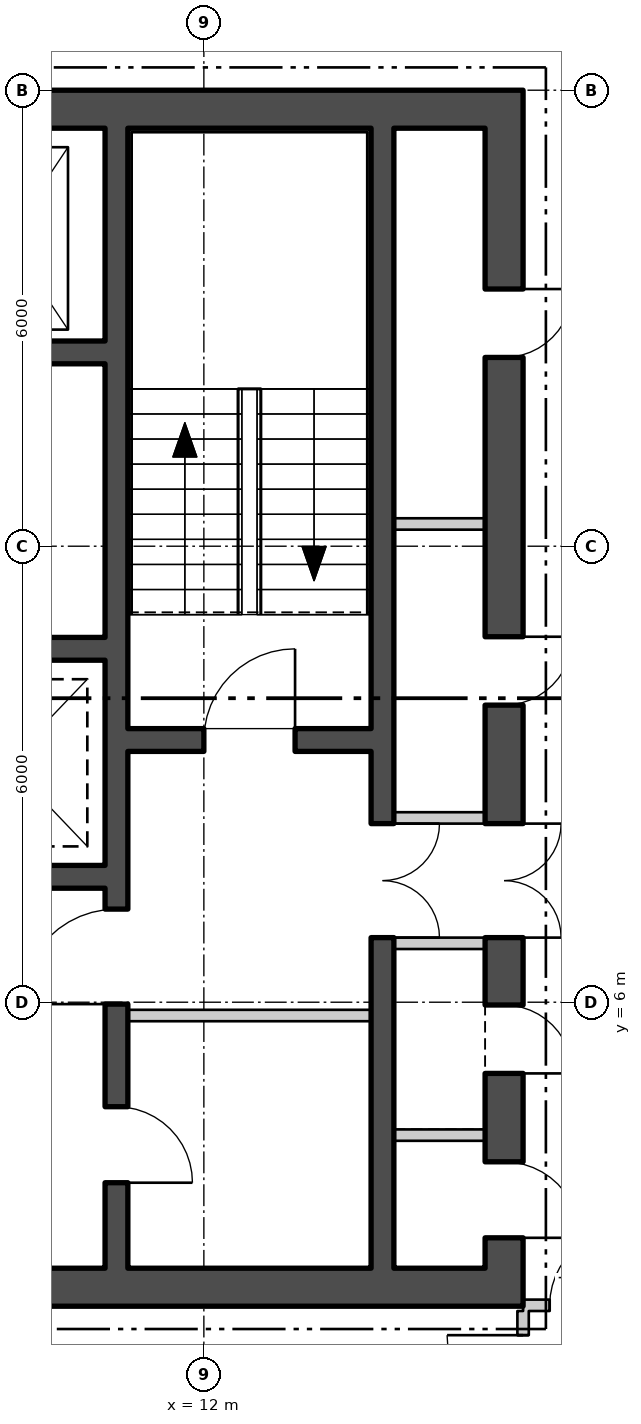
"""IFC4 building model, lengths in metres.
Left out: names, types, materials, properties, quantities, classifications, styles, units other than length and angle.
Written with IfcOpenShell. Run it as: python <this file> out.ifc"""

import sys

from ifc_helpers import new_model, si_unit, direction, frame, frame_2d, origin, place, context, subcontext, project, spatial, polyline, rectangle, outline, extrude, element, fill, save


model = new_model("IFC4")
c1 = context("Model", 3, precision=1e-05, world=origin(), true_north=direction((0.0, 1.0)))
c2 = subcontext(c1, "Body", "Model", "MODEL_VIEW")
j1 = project(units=[si_unit("LENGTHUNIT", "METRE"), si_unit("PLANEANGLEUNIT", "RADIAN")], contexts=[c1])
p1 = place(None, origin())
s1 = spatial("IfcSite", under=j1, at=p1, CompositionType="ELEMENT")
p2 = place(p1, origin())
s2 = spatial("IfcBuilding", under=s1, at=p2, CompositionType="ELEMENT")
p3 = place(p2, frame((0.0, 0.0, 186.6)))
s3 = spatial("IfcBuildingStorey", under=s2, at=p3, CompositionType="ELEMENT", Elevation=186.6)
p4 = place(p3, frame((3.8, -26.219, -0.18), z_axis=(0.0, 0.0, 1.0), x_axis=(0.500000711659, 0.866024992908, 0.0)))
e1 = element("IfcWall", 1, at=p4, inside=s3, PredefinedType="SOLIDWALL", context=c2, shape_type="SweptSolid", body=[
    extrude(outline(polyline([(-0.13, -0.225), (45.87, -0.225), (45.61, 0.225), (0.13, 0.225), (-0.13, -0.225)])), origin(), (0.0, 0.0, 1.0), 6.0),
])
p5 = place(p4, frame((1.424, 0.0, 1.38)))
e2 = element("IfcOpeningElement", 2, at=p5, cuts=e1, PredefinedType="OPENING", context=c2, shape_type="SweptSolid", body=[
    extrude(rectangle(XDim=2.4, YDim=3.6, at=frame_2d((1.2, 1.8))), frame((0.0, 0.235, 0.0), z_axis=(0.0, -1.0, 0.0), x_axis=(1.0, 0.0, 0.0)), (0.0, 0.0, 1.0), 0.47),
])
p6 = place(p4, frame((5.893, 0.0, 1.38)))
e3 = element("IfcOpeningElement", 3, at=p6, cuts=e1, PredefinedType="OPENING", context=c2, shape_type="SweptSolid", body=[
    extrude(rectangle(XDim=2.4, YDim=3.6, at=frame_2d((1.2, 1.8))), frame((0.0, 0.235, 0.0), z_axis=(0.0, -1.0, 0.0), x_axis=(1.0, 0.0, 0.0)), (0.0, 0.0, 1.0), 0.47),
])
p7 = place(p4, frame((10.401, 0.0, 1.38)))
e4 = element("IfcOpeningElement", 4, at=p7, cuts=e1, PredefinedType="OPENING", context=c2, shape_type="SweptSolid", body=[
    extrude(rectangle(XDim=2.4, YDim=3.6, at=frame_2d((1.2, 1.8))), frame((0.0, 0.235, 0.0), z_axis=(0.0, -1.0, 0.0), x_axis=(1.0, 0.0, 0.0)), (0.0, 0.0, 1.0), 0.47),
])
p8 = place(p4, frame((14.909, 0.0, 1.38)))
e5 = element("IfcOpeningElement", 5, at=p8, cuts=e1, PredefinedType="OPENING", context=c2, shape_type="SweptSolid", body=[
    extrude(rectangle(XDim=2.4, YDim=3.6, at=frame_2d((1.2, 1.8))), frame((0.0, 0.235, 0.0), z_axis=(0.0, -1.0, 0.0), x_axis=(1.0, 0.0, 0.0)), (0.0, 0.0, 1.0), 0.47),
])
p9 = place(p4, frame((19.416, 0.0, 1.38)))
e6 = element("IfcOpeningElement", 6, at=p9, cuts=e1, PredefinedType="OPENING", context=c2, shape_type="SweptSolid", body=[
    extrude(rectangle(XDim=2.4, YDim=3.6, at=frame_2d((1.2, 1.8))), frame((0.0, 0.235, 0.0), z_axis=(0.0, -1.0, 0.0), x_axis=(1.0, 0.0, 0.0)), (0.0, 0.0, 1.0), 0.47),
])
p10 = place(p4, frame((23.924, 0.0, 1.38)))
e7 = element("IfcOpeningElement", 7, at=p10, cuts=e1, PredefinedType="OPENING", context=c2, shape_type="SweptSolid", body=[
    extrude(rectangle(XDim=2.4, YDim=3.6, at=frame_2d((1.2, 1.8))), frame((0.0, 0.235, 0.0), z_axis=(0.0, -1.0, 0.0), x_axis=(1.0, 0.0, 0.0)), (0.0, 0.0, 1.0), 0.47),
])
p11 = place(p4, frame((28.431, 0.0, 1.38)))
e8 = element("IfcOpeningElement", 8, at=p11, cuts=e1, PredefinedType="OPENING", context=c2, shape_type="SweptSolid", body=[
    extrude(rectangle(XDim=2.4, YDim=3.6, at=frame_2d((1.2, 1.8))), frame((0.0, 0.235, 0.0), z_axis=(0.0, -1.0, 0.0), x_axis=(1.0, 0.0, 0.0)), (0.0, 0.0, 1.0), 0.47),
])
p12 = place(p4, frame((32.939, 0.0, 1.38)))
e9 = element("IfcOpeningElement", 9, at=p12, cuts=e1, PredefinedType="OPENING", context=c2, shape_type="SweptSolid", body=[
    extrude(rectangle(XDim=2.4, YDim=3.6, at=frame_2d((1.2, 1.8))), frame((0.0, 0.235, 0.0), z_axis=(0.0, -1.0, 0.0), x_axis=(1.0, 0.0, 0.0)), (0.0, 0.0, 1.0), 0.47),
])
p13 = place(p4, frame((37.447, 0.0, 1.38)))
e10 = element("IfcOpeningElement", 10, at=p13, cuts=e1, PredefinedType="OPENING", context=c2, shape_type="SweptSolid", body=[
    extrude(rectangle(XDim=2.4, YDim=3.6, at=frame_2d((1.2, 1.8))), frame((0.0, 0.235, 0.0), z_axis=(0.0, -1.0, 0.0), x_axis=(1.0, 0.0, 0.0)), (0.0, 0.0, 1.0), 0.47),
])
p14 = place(p4, frame((41.916, 0.0, 1.38)))
e11 = element("IfcOpeningElement", 11, at=p14, cuts=e1, PredefinedType="OPENING", context=c2, shape_type="SweptSolid", body=[
    extrude(rectangle(XDim=2.4, YDim=3.6, at=frame_2d((1.2, 1.8))), frame((0.0, 0.235, 0.0), z_axis=(0.0, -1.0, 0.0), x_axis=(1.0, 0.0, 0.0)), (0.0, 0.0, 1.0), 0.47),
])
p15 = place(p3, frame((-16.2, 2.25, 0.0), z_axis=(0.0, 0.0, 1.0), x_axis=(1.0, 0.0, 0.0)))
e12 = element("IfcWall", 12, at=p15, inside=s3, PredefinedType="SHEAR", context=c2, shape_type="SweptSolid", body=[
    extrude(rectangle(XDim=32.4, YDim=0.5, at=frame_2d((16.2, 0.0))), origin(), (0.0, 0.0, 1.0), 5.8),
])
p16 = place(p15, frame((10.7, 0.0, 0.0)))
e13 = element("IfcOpeningElement", 13, at=p16, cuts=e12, PredefinedType="OPENING", context=c2, shape_type="SweptSolid", body=[
    extrude(rectangle(XDim=1.8, YDim=2.4, at=frame_2d((0.9, 1.2))), frame((0.0, 0.26, 0.0), z_axis=(0.0, -1.0, 0.0), x_axis=(1.0, 0.0, 0.0)), (0.0, 0.0, 1.0), 0.52),
])
p17 = place(p15, frame((20.7, 0.0, 0.0)))
e14 = element("IfcOpeningElement", 14, at=p17, cuts=e12, PredefinedType="OPENING", context=c2, shape_type="SweptSolid", body=[
    extrude(rectangle(XDim=1.8, YDim=2.4, at=frame_2d((0.9, 1.2))), frame((0.0, 0.26, 0.0), z_axis=(0.0, -1.0, 0.0), x_axis=(1.0, 0.0, 0.0)), (0.0, 0.0, 1.0), 0.52),
])
p18 = place(p3, frame((-16.2, 17.75, 0.0), z_axis=(0.0, 0.0, 1.0), x_axis=(1.0, 0.0, 0.0)))
e15 = element("IfcWall", 15, at=p18, inside=s3, PredefinedType="SHEAR", context=c2, shape_type="SweptSolid", body=[
    extrude(rectangle(XDim=32.4, YDim=0.5, at=frame_2d((16.2, 0.0))), origin(), (0.0, 0.0, 1.0), 5.8),
])
p19 = place(p3, frame((15.95, 2.5, 0.0), z_axis=(0.0, 0.0, 1.0), x_axis=(0.0, 1.0, 0.0)))
e16 = element("IfcWall", 16, at=p19, inside=s3, PredefinedType="SHEAR", context=c2, shape_type="SweptSolid", body=[
    extrude(rectangle(XDim=15.0, YDim=0.5, at=frame_2d((7.5, 0.0))), origin(), (0.0, 0.0, 1.0), 5.8),
])
p20 = place(p19, frame((4.35, 0.0, 0.0)))
e17 = element("IfcOpeningElement", 17, at=p20, cuts=e16, PredefinedType="OPENING", context=c2, shape_type="SweptSolid", body=[
    extrude(rectangle(XDim=1.5, YDim=2.1, at=frame_2d((0.75, 1.05))), frame((0.0, 0.26, 0.0), z_axis=(0.0, -1.0, 0.0), x_axis=(1.0, 0.0, 0.0)), (0.0, 0.0, 1.0), 0.52),
])
p21 = place(p19, frame((0.4, 0.0, 0.0)))
e18 = element("IfcOpeningElement", 18, at=p21, cuts=e16, PredefinedType="OPENING", context=c2, shape_type="SweptSolid", body=[
    extrude(rectangle(XDim=1.0, YDim=2.1, at=frame_2d((0.5, 1.05))), frame((0.0, 0.26, 0.0), z_axis=(0.0, -1.0, 0.0), x_axis=(1.0, 0.0, 0.0)), (0.0, 0.0, 1.0), 0.52),
])
p22 = place(p19, frame((2.563, 0.0, 0.0)))
e19 = element("IfcOpeningElement", 19, at=p22, cuts=e16, PredefinedType="OPENING", context=c2, shape_type="SweptSolid", body=[
    extrude(rectangle(XDim=0.9, YDim=2.1, at=frame_2d((0.45, 1.05))), frame((0.0, 0.26, 0.0), z_axis=(0.0, -1.0, 0.0), x_axis=(1.0, 0.0, 0.0)), (0.0, 0.0, 1.0), 0.52),
])
p23 = place(p19, frame((7.409, 0.0, 0.0)))
e20 = element("IfcOpeningElement", 20, at=p23, cuts=e16, PredefinedType="OPENING", context=c2, shape_type="SweptSolid", body=[
    extrude(rectangle(XDim=0.9, YDim=2.1, at=frame_2d((0.45, 1.05))), frame((0.0, 0.26, 0.0), z_axis=(0.0, -1.0, 0.0), x_axis=(1.0, 0.0, 0.0)), (0.0, 0.0, 1.0), 0.52),
])
p24 = place(p19, frame((11.984, 0.0, 0.0)))
e21 = element("IfcOpeningElement", 21, at=p24, cuts=e16, PredefinedType="OPENING", context=c2, shape_type="SweptSolid", body=[
    extrude(rectangle(XDim=0.9, YDim=2.1, at=frame_2d((0.45, 1.05))), frame((0.0, 0.26, 0.0), z_axis=(0.0, -1.0, 0.0), x_axis=(1.0, 0.0, 0.0)), (0.0, 0.0, 1.0), 0.52),
])
p25 = place(p3, frame((10.85, 2.5, 0.0), z_axis=(0.0, 0.0, 1.0), x_axis=(0.0, 1.0, 0.0)))
e22 = element("IfcWall", 22, at=p25, inside=s3, PredefinedType="SHEAR", context=c2, shape_type="SweptSolid", body=[
    extrude(rectangle(XDim=15.0, YDim=0.3, at=frame_2d((7.5, 0.0))), origin(), (0.0, 0.0, 1.0), 5.8),
])
p26 = place(p25, frame((3.475, 0.0, 0.0)))
e23 = element("IfcOpeningElement", 23, at=p26, cuts=e22, PredefinedType="OPENING", context=c2, shape_type="SweptSolid", body=[
    extrude(rectangle(XDim=1.25, YDim=2.1, at=frame_2d((0.625, 1.05))), frame((0.0, 0.16, 0.0), z_axis=(0.0, -1.0, 0.0), x_axis=(1.0, 0.0, 0.0)), (0.0, 0.0, 1.0), 0.32),
])
p27 = place(p25, frame((1.125, 0.0, 0.0)))
e24 = element("IfcOpeningElement", 24, at=p27, cuts=e22, PredefinedType="OPENING", context=c2, shape_type="SweptSolid", body=[
    extrude(rectangle(XDim=1.0, YDim=2.1, at=frame_2d((0.5, 1.05))), frame((0.0, 0.16, 0.0), z_axis=(0.0, -1.0, 0.0), x_axis=(1.0, 0.0, 0.0)), (0.0, 0.0, 1.0), 0.32),
])
p28 = place(p3, frame((14.35, 2.5, 0.0), z_axis=(0.0, 0.0, 1.0), x_axis=(0.0, 1.0, 0.0)))
e25 = element("IfcWall", 25, at=p28, inside=s3, PredefinedType="SHEAR", context=c2, shape_type="SweptSolid", body=[
    extrude(rectangle(XDim=15.0, YDim=0.3, at=frame_2d((7.5, 0.0))), origin(), (0.0, 0.0, 1.0), 5.8),
])
p29 = place(p28, frame((4.35, 0.0, 0.0)))
e26 = element("IfcOpeningElement", 26, at=p29, cuts=e25, PredefinedType="OPENING", context=c2, shape_type="SweptSolid", body=[
    extrude(rectangle(XDim=1.5, YDim=2.1, at=frame_2d((0.75, 1.05))), frame((0.0, 0.16, 0.0), z_axis=(0.0, -1.0, 0.0), x_axis=(1.0, 0.0, 0.0)), (0.0, 0.0, 1.0), 0.32),
])
p30 = place(p3, frame((11.0, 9.45, 0.0), z_axis=(0.0, 0.0, 1.0), x_axis=(1.0, 0.0, 0.0)))
e27 = element("IfcWall", 27, at=p30, inside=s3, PredefinedType="SHEAR", context=c2, shape_type="SweptSolid", body=[
    extrude(rectangle(XDim=3.2, YDim=0.3, at=frame_2d((1.6, 0.0))), origin(), (0.0, 0.0, 1.0), 5.8),
])
p31 = place(p30, frame((1.0, 0.0, 0.0)))
e28 = element("IfcOpeningElement", 28, at=p31, cuts=e27, PredefinedType="OPENING", context=c2, shape_type="SweptSolid", body=[
    extrude(rectangle(XDim=1.2, YDim=2.1, at=frame_2d((0.6, 1.05))), frame((0.0, 0.16, 0.0), z_axis=(0.0, -1.0, 0.0), x_axis=(1.0, 0.0, 0.0)), (0.0, 0.0, 1.0), 0.32),
])
p32 = place(p3, frame((-10.7, 14.55, 0.0), z_axis=(0.0, 0.0, 1.0), x_axis=(1.0, 0.0, 0.0)))
e29 = element("IfcWall", 29, at=p32, inside=s3, PredefinedType="SHEAR", context=c2, shape_type="SweptSolid", body=[
    extrude(rectangle(XDim=21.4, YDim=0.3, at=frame_2d((10.7, 0.0))), origin(), (0.0, 0.0, 1.0), 5.8),
])
p33 = place(p32, frame((0.738, 0.0, 0.0)))
e30 = element("IfcOpeningElement", 30, at=p33, cuts=e29, PredefinedType="OPENING", context=c2, shape_type="SweptSolid", body=[
    extrude(rectangle(XDim=1.1, YDim=2.1, at=frame_2d((0.55, 1.05))), frame((0.0, 0.16, 0.0), z_axis=(0.0, -1.0, 0.0), x_axis=(1.0, 0.0, 0.0)), (0.0, 0.0, 1.0), 0.32),
])
p34 = place(p32, frame((3.462, 0.0, 0.0)))
e31 = element("IfcOpeningElement", 31, at=p34, cuts=e29, PredefinedType="OPENING", context=c2, shape_type="SweptSolid", body=[
    extrude(rectangle(XDim=1.1, YDim=2.1, at=frame_2d((0.55, 1.05))), frame((0.0, 0.16, 0.0), z_axis=(0.0, -1.0, 0.0), x_axis=(1.0, 0.0, 0.0)), (0.0, 0.0, 1.0), 0.32),
])
p35 = place(p32, frame((6.138, 0.0, 0.0)))
e32 = element("IfcOpeningElement", 32, at=p35, cuts=e29, PredefinedType="OPENING", context=c2, shape_type="SweptSolid", body=[
    extrude(rectangle(XDim=1.1, YDim=2.1, at=frame_2d((0.55, 1.05))), frame((0.0, 0.16, 0.0), z_axis=(0.0, -1.0, 0.0), x_axis=(1.0, 0.0, 0.0)), (0.0, 0.0, 1.0), 0.32),
])
p36 = place(p32, frame((8.812, 0.0, 0.0)))
e33 = element("IfcOpeningElement", 33, at=p36, cuts=e29, PredefinedType="OPENING", context=c2, shape_type="SweptSolid", body=[
    extrude(rectangle(XDim=1.1, YDim=2.1, at=frame_2d((0.55, 1.05))), frame((0.0, 0.16, 0.0), z_axis=(0.0, -1.0, 0.0), x_axis=(1.0, 0.0, 0.0)), (0.0, 0.0, 1.0), 0.32),
])
p37 = place(p32, frame((19.562, 0.0, 0.0)))
e34 = element("IfcOpeningElement", 34, at=p37, cuts=e29, PredefinedType="OPENING", context=c2, shape_type="SweptSolid", body=[
    extrude(rectangle(XDim=1.1, YDim=2.1, at=frame_2d((0.55, 1.05))), frame((0.0, 0.16, 0.0), z_axis=(0.0, -1.0, 0.0), x_axis=(1.0, 0.0, 0.0)), (0.0, 0.0, 1.0), 0.32),
])
p38 = place(p32, frame((14.213, 0.0, 0.0)))
e35 = element("IfcOpeningElement", 35, at=p38, cuts=e29, PredefinedType="OPENING", context=c2, shape_type="SweptSolid", body=[
    extrude(rectangle(XDim=1.0, YDim=2.1, at=frame_2d((0.5, 1.05))), frame((0.0, 0.16, 0.0), z_axis=(0.0, -1.0, 0.0), x_axis=(1.0, 0.0, 0.0)), (0.0, 0.0, 1.0), 0.32),
])
p39 = place(p3, frame((2.6, 10.65, 0.0), z_axis=(0.0, 0.0, 1.0), x_axis=(1.0, 0.0, 0.0)))
e36 = element("IfcWall", 36, at=p39, inside=s3, PredefinedType="SHEAR", context=c2, shape_type="SweptSolid", body=[
    extrude(rectangle(XDim=8.1, YDim=0.3, at=frame_2d((4.05, 0.0))), origin(), (0.0, 0.0, 1.0), 5.8),
])
p40 = place(p39, frame((0.933, 0.0, 0.0)))
e37 = element("IfcOpeningElement", 37, at=p40, cuts=e36, PredefinedType="OPENING", context=c2, shape_type="SweptSolid", body=[
    extrude(rectangle(XDim=1.0, YDim=2.1, at=frame_2d((0.5, 1.05))), frame((0.0, 0.16, 0.0), z_axis=(0.0, -1.0, 0.0), x_axis=(1.0, 0.0, 0.0)), (0.0, 0.0, 1.0), 0.32),
])
p41 = place(p3, frame((2.6, 7.65, 0.0), z_axis=(0.0, 0.0, 1.0), x_axis=(1.0, 0.0, 0.0)))
e38 = element("IfcWall", 38, at=p41, inside=s3, PredefinedType="SHEAR", context=c2, shape_type="SweptSolid", body=[
    extrude(rectangle(XDim=8.1, YDim=0.3, at=frame_2d((4.05, 0.0))), origin(), (0.0, 0.0, 1.0), 5.8),
])
p42 = place(p3, frame((11.0, 5.825, 0.0), z_axis=(0.0, 0.0, 1.0), x_axis=(1.0, 0.0, 0.0)))
e39 = element("IfcWall", 39, at=p42, inside=s3, PredefinedType="PARTITIONING", context=c2, shape_type="SweptSolid", body=[
    extrude(rectangle(XDim=3.2, YDim=0.15, at=frame_2d((1.6, 0.0))), origin(), (0.0, 0.0, 1.0), 5.8),
])
for number, where, z_axis, x_axis in (
    (40, (14.5, 6.775, 0.0), (0.0, 0.0, 1.0), (1.0, 0.0, 0.0)),
    (41, (14.5, 8.425, 0.0), (0.0, 0.0, 1.0), (1.0, 0.0, 0.0)),
    (42, (14.5, 4.251, 0.0), (0.0, 0.0, 1.0), (1.0, 0.0, 0.0)),
    (43, (14.5, 12.293, 0.0), (0.0, 0.0, 1.0), (1.0, 0.0, 0.0)),
):
    element("IfcWall", number, at=place(p3, frame(where, z_axis=z_axis, x_axis=x_axis)), inside=s3, PredefinedType="PARTITIONING", context=c2, shape_type="SweptSolid", body=[
        extrude(rectangle(XDim=1.2, YDim=0.15, at=frame_2d((0.6, 0.0))), origin(), (0.0, 0.0, 1.0), 5.8),
    ])
p43 = place(p3, frame((16.2, 0.3, 0.0), z_axis=(0.0, 0.0, 1.0), x_axis=(0.0, 1.0, 0.0)))
e44 = element("IfcWall", 44, at=p43, inside=s3, PredefinedType="PARTITIONING", context=c2, shape_type="SweptSolid", body=[
    extrude(rectangle(XDim=1.637, YDim=0.15, at=frame_2d((0.819, 0.0))), origin(), (0.0, 0.0, 1.0), 5.8),
])
p44 = place(p43, frame((0.319, 0.0, 0.0)))
e45 = element("IfcOpeningElement", 45, at=p44, cuts=e44, PredefinedType="OPENING", context=c2, shape_type="SweptSolid", body=[
    extrude(rectangle(XDim=1.0, YDim=2.1, at=frame_2d((0.5, 1.05))), frame((0.0, 0.085, 0.0), z_axis=(0.0, -1.0, 0.0), x_axis=(1.0, 0.0, 0.0)), (0.0, 0.0, 1.0), 0.17),
])
p45 = place(p3, frame((16.2, 2.012, 0.0), z_axis=(0.0, 0.0, 1.0), x_axis=(1.0, 0.0, 0.0)))
e46 = element("IfcWall", 46, at=p45, inside=s3, PredefinedType="PARTITIONING", context=c2, shape_type="SweptSolid", body=[
    extrude(rectangle(XDim=1.7, YDim=0.15, at=frame_2d((0.85, 0.0))), origin(), (0.0, 0.0, 1.0), 5.21),
])
p46 = place(p45, frame((0.35, 0.0, 0.0)))
e47 = element("IfcOpeningElement", 47, at=p46, cuts=e46, PredefinedType="OPENING", context=c2, shape_type="SweptSolid", body=[
    extrude(rectangle(XDim=1.0, YDim=2.1, at=frame_2d((0.5, 1.05))), frame((0.0, 0.085, 0.0), z_axis=(0.0, -1.0, 0.0), x_axis=(1.0, 0.0, 0.0)), (0.0, 0.0, 1.0), 0.17),
])
p47 = place(p31, origin())
e48 = element("IfcDoor", 48, at=p47, inside=s3, OperationType="SINGLE_SWING_LEFT", PredefinedType="DOOR", context=c2, shape_type="SweptSolid", body=[
    extrude(rectangle(XDim=1.2, YDim=2.1, at=frame_2d((0.6, 1.05))), frame((0.0, 0.025, 0.0), z_axis=(0.0, -1.0, 0.0), x_axis=(1.0, 0.0, 0.0)), (0.0, 0.0, 1.0), 0.05),
])
fill(e28, e48)
p48 = place(p26, origin())
e49 = element("IfcDoor", 49, at=p48, inside=s3, OperationType="SINGLE_SWING_RIGHT", PredefinedType="DOOR", context=c2, shape_type="SweptSolid", body=[
    extrude(rectangle(XDim=1.25, YDim=2.1, at=frame_2d((0.625, 1.05))), frame((0.0, 0.025, 0.0), z_axis=(0.0, -1.0, 0.0), x_axis=(1.0, 0.0, 0.0)), (0.0, 0.0, 1.0), 0.05),
])
fill(e23, e49)
p49 = place(p27, origin())
e50 = element("IfcDoor", 50, at=p49, inside=s3, OperationType="SINGLE_SWING_LEFT", PredefinedType="DOOR", context=c2, shape_type="SweptSolid", body=[
    extrude(rectangle(XDim=1.0, YDim=2.1, at=frame_2d((0.5, 1.05))), frame((0.0, 0.025, 0.0), z_axis=(0.0, -1.0, 0.0), x_axis=(1.0, 0.0, 0.0)), (0.0, 0.0, 1.0), 0.05),
])
fill(e24, e50)
p50 = place(p29, origin())
e51 = element("IfcDoor", 51, at=p50, inside=s3, OperationType="DOUBLE_DOOR_SINGLE_SWING", PredefinedType="DOOR", context=c2, shape_type="SweptSolid", body=[
    extrude(rectangle(XDim=1.5, YDim=2.1, at=frame_2d((0.75, 1.05))), frame((0.0, 0.025, 0.0), z_axis=(0.0, -1.0, 0.0), x_axis=(1.0, 0.0, 0.0)), (0.0, 0.0, 1.0), 0.05),
])
fill(e26, e51)
p51 = place(p20, origin())
e52 = element("IfcDoor", 52, at=p51, inside=s3, OperationType="DOUBLE_DOOR_SINGLE_SWING", PredefinedType="DOOR", context=c2, shape_type="SweptSolid", body=[
    extrude(rectangle(XDim=1.5, YDim=2.1, at=frame_2d((0.75, 1.05))), frame((0.0, 0.025, 0.0), z_axis=(0.0, -1.0, 0.0), x_axis=(1.0, 0.0, 0.0)), (0.0, 0.0, 1.0), 0.05),
])
fill(e17, e52)
p52 = place(p21, origin())
e53 = element("IfcDoor", 53, at=p52, inside=s3, OperationType="SINGLE_SWING_LEFT", PredefinedType="DOOR", context=c2, shape_type="SweptSolid", body=[
    extrude(rectangle(XDim=1.0, YDim=2.1, at=frame_2d((0.5, 1.05))), frame((0.0, 0.025, 0.0), z_axis=(0.0, -1.0, 0.0), x_axis=(1.0, 0.0, 0.0)), (0.0, 0.0, 1.0), 0.05),
])
fill(e18, e53)
p53 = place(p22, origin())
e54 = element("IfcDoor", 54, at=p53, inside=s3, OperationType="SINGLE_SWING_LEFT", PredefinedType="DOOR", context=c2, shape_type="SweptSolid", body=[
    extrude(rectangle(XDim=0.9, YDim=2.1, at=frame_2d((0.45, 1.05))), frame((0.0, 0.025, 0.0), z_axis=(0.0, -1.0, 0.0), x_axis=(1.0, 0.0, 0.0)), (0.0, 0.0, 1.0), 0.05),
])
fill(e19, e54)
p54 = place(p23, origin())
e55 = element("IfcDoor", 55, at=p54, inside=s3, OperationType="SINGLE_SWING_RIGHT", PredefinedType="DOOR", context=c2, shape_type="SweptSolid", body=[
    extrude(rectangle(XDim=0.9, YDim=2.1, at=frame_2d((0.45, 1.05))), frame((0.0, 0.025, 0.0), z_axis=(0.0, -1.0, 0.0), x_axis=(1.0, 0.0, 0.0)), (0.0, 0.0, 1.0), 0.05),
])
fill(e20, e55)
p55 = place(p24, origin())
e56 = element("IfcDoor", 56, at=p55, inside=s3, OperationType="SINGLE_SWING_RIGHT", PredefinedType="DOOR", context=c2, shape_type="SweptSolid", body=[
    extrude(rectangle(XDim=0.9, YDim=2.1, at=frame_2d((0.45, 1.05))), frame((0.0, 0.025, 0.0), z_axis=(0.0, -1.0, 0.0), x_axis=(1.0, 0.0, 0.0)), (0.0, 0.0, 1.0), 0.05),
])
fill(e21, e56)
p56 = place(p44, origin())
e57 = element("IfcDoor", 57, at=p56, inside=s3, OperationType="SINGLE_SWING_LEFT", PredefinedType="DOOR", context=c2, shape_type="SweptSolid", body=[
    extrude(rectangle(XDim=1.0, YDim=2.1, at=frame_2d((0.5, 1.05))), frame((0.0, 0.025, 0.0), z_axis=(0.0, -1.0, 0.0), x_axis=(1.0, 0.0, 0.0)), (0.0, 0.0, 1.0), 0.05),
])
fill(e45, e57)
p57 = place(p46, origin())
e58 = element("IfcDoor", 58, at=p57, inside=s3, OperationType="SINGLE_SWING_LEFT", PredefinedType="DOOR", context=c2, shape_type="SweptSolid", body=[
    extrude(rectangle(XDim=1.0, YDim=2.1, at=frame_2d((0.5, 1.05))), frame((0.0, 0.025, 0.0), z_axis=(0.0, -1.0, 0.0), x_axis=(1.0, 0.0, 0.0)), (0.0, 0.0, 1.0), 0.05),
])
fill(e47, e58)
save(model, sys.argv[1])
